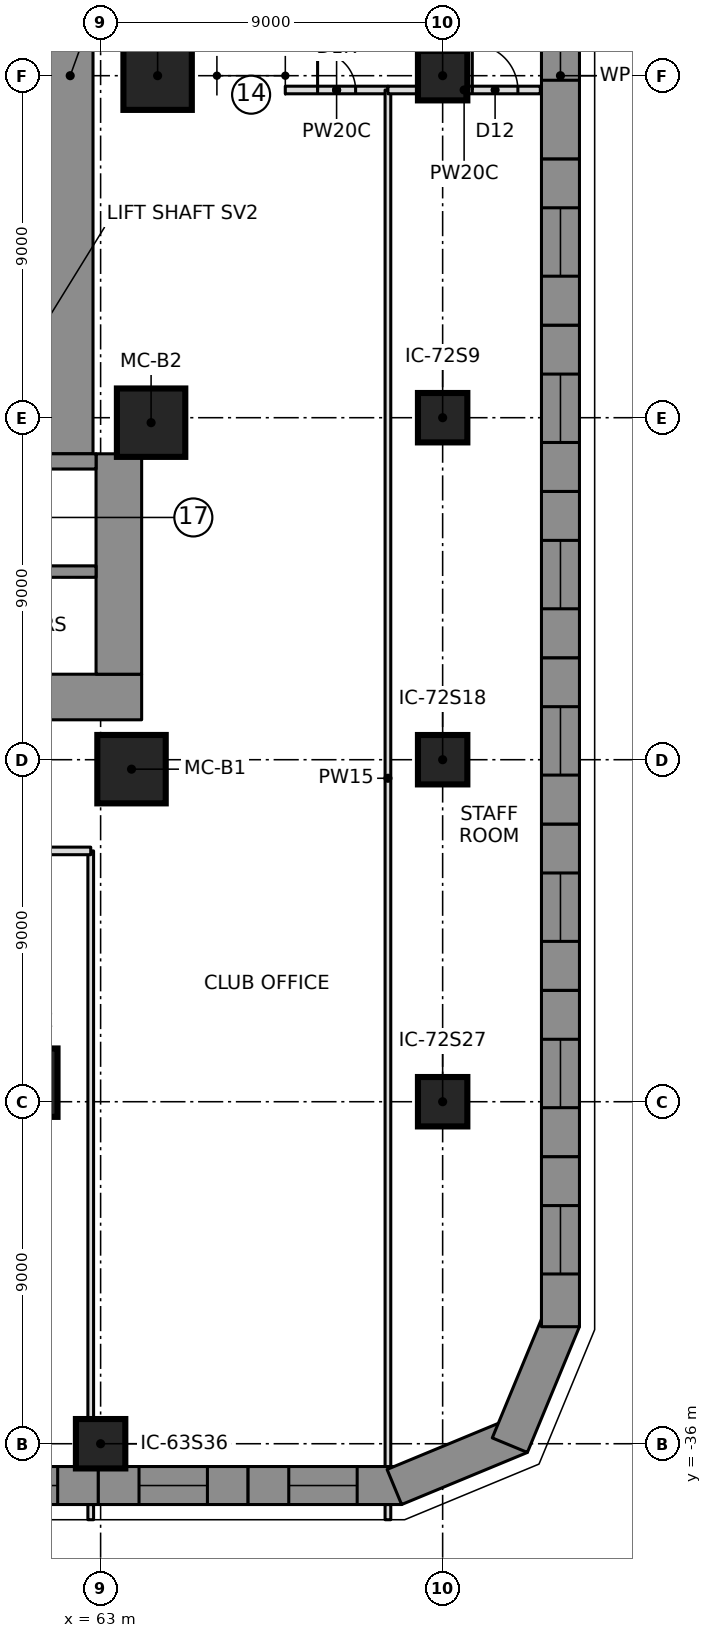
"""IFC4 building model, lengths in metres.
Left out: names, types, materials, properties, quantities, classifications, styles, units other than length and angle.
Written with IfcOpenShell. Run it as: python <this file> out.ifc"""

import sys

from ifc_helpers import new_model, si_unit, direction, frame, frame_2d, origin, origin_2d, place, context, subcontext, project, spatial, polyline, rectangle, outline, extrude, element, fill, save


model = new_model("IFC4")
c1 = context("Model", 3, precision=1e-05, world=origin(), true_north=direction((0.0, 1.0)))
c2 = subcontext(c1, "Body", "Model", "MODEL_VIEW")
j1 = project(units=[si_unit("LENGTHUNIT", "METRE"), si_unit("PLANEANGLEUNIT", "RADIAN")], contexts=[c1])
p1 = place(None, origin())
s1 = spatial("IfcSite", under=j1, at=p1, CompositionType="ELEMENT")
p2 = place(p1, origin())
s2 = spatial("IfcBuilding", under=s1, at=p2, CompositionType="ELEMENT")
p3 = place(p2, frame((0.0, 0.0, 24.0)))
s3 = spatial("IfcBuildingStorey", under=s2, at=p3, CompositionType="ELEMENT", Elevation=24.0)
p4 = place(p3, frame((50.7, -16.35, 0.0), z_axis=(0.0, 0.0, 1.0), x_axis=(1.0, 0.0, 0.0)))
e1 = element("IfcWall", 1, at=p4, inside=s3, PredefinedType="SHEAR", context=c2, shape_type="SweptSolid", body=[
    extrude(rectangle(XDim=13.38, YDim=1.2, at=frame_2d((6.69, 0.0))), origin(), (0.0, 0.0, 1.0), 5.0),
])
p5 = place(p3, frame((63.48, -15.75, 0.0), z_axis=(0.0, 0.0, 1.0), x_axis=(0.0, 1.0, 0.0)))
e2 = element("IfcWall", 2, at=p5, inside=s3, PredefinedType="SHEAR", context=c2, shape_type="SweptSolid", body=[
    extrude(rectangle(XDim=5.8, YDim=1.2, at=frame_2d((2.9, 0.0))), origin(), (0.0, 0.0, 1.0), 5.0),
])
p6 = place(p3, frame((62.2, -9.95, 0.0), z_axis=(0.0, 0.0, 1.0), x_axis=(0.0, 1.0, 0.0)))
e3 = element("IfcWall", 3, at=p6, inside=s3, PredefinedType="SHEAR", context=c2, shape_type="SweptSolid", body=[
    extrude(rectangle(XDim=19.9, YDim=1.2, at=frame_2d((9.95, 0.0))), origin(), (0.0, 0.0, 1.0), 5.0),
])
p7 = place(p3, frame((50.7, -10.15, 0.0), z_axis=(0.0, 0.0, 1.0), x_axis=(1.0, 0.0, 0.0)))
e4 = element("IfcWall", 4, at=p7, inside=s3, PredefinedType="SHEAR", context=c2, shape_type="SweptSolid", body=[
    extrude(rectangle(XDim=12.18, YDim=0.4, at=frame_2d((6.09, 0.0))), origin(), (0.0, 0.0, 1.0), 5.0),
])
p8 = place(p3, frame((56.0, -13.05, 0.0), z_axis=(0.0, 0.0, 1.0), x_axis=(1.0, 0.0, 0.0)))
e5 = element("IfcWall", 5, at=p8, inside=s3, PredefinedType="SHEAR", context=c2, shape_type="SweptSolid", body=[
    extrude(rectangle(XDim=6.88, YDim=0.3, at=frame_2d((3.44, 0.0))), origin(), (0.0, 0.0, 1.0), 5.0),
])
for number, where, z_axis, x_axis in (
    (6, (60.966, -26.499, 0.0), (0.0, 0.0, 1.0), (1.0, 0.0, 0.0)),
    (7, (63.813, -18.249, 0.0), (0.0, 0.0, 1.0), (1.0, 0.0, 0.0)),
    (8, (64.328, -9.131, 0.0), (0.0, 0.0, 1.0), (1.0, 0.0, 0.0)),
    (9, (64.5, 0.0, 0.0), (0.0, 0.0, 1.0), (1.0, 0.0, 0.0)),
):
    element("IfcColumn", number, at=place(p3, frame(where, z_axis=z_axis, x_axis=x_axis)), inside=s3, PredefinedType="COLUMN", context=c2, shape_type="SweptSolid", body=[
        extrude(rectangle(XDim=1.8, YDim=1.8, at=origin_2d()), origin(), (0.0, 0.0, 1.0), 5.0),
    ])
for number, where, z_axis, x_axis in (
    (10, (63.0, -36.0, 0.0), (0.0, 0.0, 1.0), (1.0, 0.0, 0.0)),
    (11, (72.0, -27.0, 0.0), (0.0, 0.0, 1.0), (1.0, 0.0, 0.0)),
    (12, (72.0, -18.0, 0.0), (0.0, 0.0, 1.0), (1.0, 0.0, 0.0)),
    (13, (72.0, -9.0, 0.0), (0.0, 0.0, 1.0), (1.0, 0.0, 0.0)),
    (14, (72.0, 0.0, 0.0), (0.0, 0.0, 1.0), (1.0, 0.0, 0.0)),
):
    element("IfcColumn", number, at=place(p3, frame(where, z_axis=z_axis, x_axis=x_axis)), inside=s3, PredefinedType="COLUMN", context=c2, shape_type="SweptSolid", body=[
        extrude(rectangle(XDim=1.3, YDim=1.3, at=origin_2d()), origin(), (0.0, 0.0, 1.0), 4.65),
    ])
p9 = place(p3, frame((59.0, -37.1, 0.0), z_axis=(0.0, 0.0, 1.0), x_axis=(1.0, 0.0, 0.0)))
e15 = element("IfcWall", 15, at=p9, inside=s3, PredefinedType="NOTDEFINED", context=c2, shape_type="SweptSolid", body=[
    extrude(outline(polyline([(0.0, -0.5), (3.94, -0.5), (3.94, 0.5), (0.0, 0.5), (0.0, -0.5)])), origin(), (0.0, 0.0, 1.0), 4.7),
])
p10 = place(p9, frame((1.07, 0.0, 0.9)))
e16 = element("IfcOpeningElement", 16, at=p10, cuts=e15, PredefinedType="OPENING", context=c2, shape_type="SweptSolid", body=[
    extrude(rectangle(XDim=1.8, YDim=2.4, at=frame_2d((0.9, 1.2))), frame((0.0, 0.51, 0.0), z_axis=(0.0, -1.0, 0.0), x_axis=(1.0, 0.0, 0.0)), (0.0, 0.0, 1.0), 1.02),
])
p11 = place(p3, frame((62.94, -37.1, 0.0), z_axis=(0.0, 0.0, 1.0), x_axis=(1.0, 0.0, 0.0)))
e17 = element("IfcWall", 17, at=p11, inside=s3, PredefinedType="NOTDEFINED", context=c2, shape_type="SweptSolid", body=[
    extrude(outline(polyline([(0.0, -0.5), (3.94, -0.5), (3.94, 0.5), (0.0, 0.5), (0.0, -0.5)])), origin(), (0.0, 0.0, 1.0), 4.7),
])
p12 = place(p11, frame((1.07, 0.0, 0.9)))
e18 = element("IfcOpeningElement", 18, at=p12, cuts=e17, PredefinedType="OPENING", context=c2, shape_type="SweptSolid", body=[
    extrude(rectangle(XDim=1.8, YDim=2.4, at=frame_2d((0.9, 1.2))), frame((0.0, 0.51, 0.0), z_axis=(0.0, -1.0, 0.0), x_axis=(1.0, 0.0, 0.0)), (0.0, 0.0, 1.0), 1.02),
])
p13 = place(p3, frame((66.881, -37.1, 0.0), z_axis=(0.0, 0.0, 1.0), x_axis=(1.0, 0.0, 0.0)))
e19 = element("IfcWall", 19, at=p13, inside=s3, PredefinedType="NOTDEFINED", context=c2, shape_type="SweptSolid", body=[
    extrude(outline(polyline([(0.0, -0.5), (4.04, -0.5), (3.841, 0.5), (0.0, 0.5), (0.0, -0.5)])), origin(), (0.0, 0.0, 1.0), 4.7),
])
p14 = place(p13, frame((1.07, 0.0, 0.9)))
e20 = element("IfcOpeningElement", 20, at=p14, cuts=e19, PredefinedType="OPENING", context=c2, shape_type="SweptSolid", body=[
    extrude(rectangle(XDim=1.8, YDim=2.4, at=frame_2d((0.9, 1.2))), frame((0.0, 0.51, 0.0), z_axis=(0.0, -1.0, 0.0), x_axis=(1.0, 0.0, 0.0)), (0.0, 0.0, 1.0), 1.02),
])
p15 = place(p3, frame((70.821, -37.1, 0.0), z_axis=(0.0, 0.0, 1.0), x_axis=(0.923862365102, 0.382724875529, 0.0)))
e21 = element("IfcWall", 21, at=p15, inside=s3, PredefinedType="NOTDEFINED", context=c2, shape_type="SweptSolid", body=[
    extrude(outline(polyline([(-0.1, -0.5), (3.482, -0.5), (3.068, 0.5), (0.1, 0.5), (-0.1, -0.5)])), origin(), (0.0, 0.0, 1.0), 4.7),
])
p16 = place(p3, frame((73.847, -35.847, 0.0), z_axis=(0.0, 0.0, 1.0), x_axis=(0.382724875529, 0.923862365102, 0.0)))
e22 = element("IfcWall", 22, at=p16, inside=s3, PredefinedType="NOTDEFINED", context=c2, shape_type="SweptSolid", body=[
    extrude(outline(polyline([(-0.207, -0.5), (3.375, -0.5), (3.175, 0.5), (0.207, 0.5), (-0.207, -0.5)])), origin(), (0.0, 0.0, 1.0), 4.7),
])
p17 = place(p3, frame((75.1, -32.821, 0.0), z_axis=(0.0, 0.0, 1.0), x_axis=(0.0, 1.0, 0.0)))
e23 = element("IfcWall", 23, at=p17, inside=s3, PredefinedType="NOTDEFINED", context=c2, shape_type="SweptSolid", body=[
    extrude(outline(polyline([(-0.1, -0.5), (4.376, -0.5), (4.376, 0.5), (0.1, 0.5), (-0.1, -0.5)])), origin(), (0.0, 0.0, 1.0), 4.7),
])
p18 = place(p17, frame((1.288, 0.0, 0.9)))
e24 = element("IfcOpeningElement", 24, at=p18, cuts=e23, PredefinedType="OPENING", context=c2, shape_type="SweptSolid", body=[
    extrude(rectangle(XDim=1.8, YDim=2.4, at=frame_2d((0.9, 1.2))), frame((0.0, 0.51, 0.0), z_axis=(0.0, -1.0, 0.0), x_axis=(1.0, 0.0, 0.0)), (0.0, 0.0, 1.0), 1.02),
])
p19 = place(p3, frame((75.1, -28.445, 0.0), z_axis=(0.0, 0.0, 1.0), x_axis=(0.0, 1.0, 0.0)))
e25 = element("IfcWall", 25, at=p19, inside=s3, PredefinedType="NOTDEFINED", context=c2, shape_type="SweptSolid", body=[
    extrude(outline(polyline([(0.0, -0.5), (4.376, -0.5), (4.376, 0.5), (0.0, 0.5), (0.0, -0.5)])), origin(), (0.0, 0.0, 1.0), 4.7),
])
p20 = place(p19, frame((1.288, 0.0, 0.9)))
e26 = element("IfcOpeningElement", 26, at=p20, cuts=e25, PredefinedType="OPENING", context=c2, shape_type="SweptSolid", body=[
    extrude(rectangle(XDim=1.8, YDim=2.4, at=frame_2d((0.9, 1.2))), frame((0.0, 0.51, 0.0), z_axis=(0.0, -1.0, 0.0), x_axis=(1.0, 0.0, 0.0)), (0.0, 0.0, 1.0), 1.02),
])
p21 = place(p3, frame((75.1, -24.069, 0.0), z_axis=(0.0, 0.0, 1.0), x_axis=(0.0, 1.0, 0.0)))
e27 = element("IfcWall", 27, at=p21, inside=s3, PredefinedType="NOTDEFINED", context=c2, shape_type="SweptSolid", body=[
    extrude(outline(polyline([(0.0, -0.5), (4.376, -0.5), (4.376, 0.5), (0.0, 0.5), (0.0, -0.5)])), origin(), (0.0, 0.0, 1.0), 4.7),
])
p22 = place(p21, frame((1.288, 0.0, 0.9)))
e28 = element("IfcOpeningElement", 28, at=p22, cuts=e27, PredefinedType="OPENING", context=c2, shape_type="SweptSolid", body=[
    extrude(rectangle(XDim=1.8, YDim=2.4, at=frame_2d((0.9, 1.2))), frame((0.0, 0.51, 0.0), z_axis=(0.0, -1.0, 0.0), x_axis=(1.0, 0.0, 0.0)), (0.0, 0.0, 1.0), 1.02),
])
p23 = place(p3, frame((75.1, -19.693, 0.0), z_axis=(0.0, 0.0, 1.0), x_axis=(0.0, 1.0, 0.0)))
e29 = element("IfcWall", 29, at=p23, inside=s3, PredefinedType="NOTDEFINED", context=c2, shape_type="SweptSolid", body=[
    extrude(outline(polyline([(0.0, -0.5), (4.376, -0.5), (4.376, 0.5), (0.0, 0.5), (0.0, -0.5)])), origin(), (0.0, 0.0, 1.0), 4.7),
])
p24 = place(p23, frame((1.288, 0.0, 0.9)))
e30 = element("IfcOpeningElement", 30, at=p24, cuts=e29, PredefinedType="OPENING", context=c2, shape_type="SweptSolid", body=[
    extrude(rectangle(XDim=1.8, YDim=2.4, at=frame_2d((0.9, 1.2))), frame((0.0, 0.51, 0.0), z_axis=(0.0, -1.0, 0.0), x_axis=(1.0, 0.0, 0.0)), (0.0, 0.0, 1.0), 1.02),
])
p25 = place(p3, frame((75.1, -15.316, 0.0), z_axis=(0.0, 0.0, 1.0), x_axis=(0.0, 1.0, 0.0)))
e31 = element("IfcWall", 31, at=p25, inside=s3, PredefinedType="NOTDEFINED", context=c2, shape_type="SweptSolid", body=[
    extrude(outline(polyline([(0.0, -0.5), (4.376, -0.5), (4.376, 0.5), (0.0, 0.5), (0.0, -0.5)])), origin(), (0.0, 0.0, 1.0), 4.7),
])
p26 = place(p25, frame((1.288, 0.0, 0.9)))
e32 = element("IfcOpeningElement", 32, at=p26, cuts=e31, PredefinedType="OPENING", context=c2, shape_type="SweptSolid", body=[
    extrude(rectangle(XDim=1.8, YDim=2.4, at=frame_2d((0.9, 1.2))), frame((0.0, 0.51, 0.0), z_axis=(0.0, -1.0, 0.0), x_axis=(1.0, 0.0, 0.0)), (0.0, 0.0, 1.0), 1.02),
])
p27 = place(p3, frame((75.1, -10.94, 0.0), z_axis=(0.0, 0.0, 1.0), x_axis=(0.0, 1.0, 0.0)))
e33 = element("IfcWall", 33, at=p27, inside=s3, PredefinedType="NOTDEFINED", context=c2, shape_type="SweptSolid", body=[
    extrude(outline(polyline([(0.0, -0.5), (4.376, -0.5), (4.376, 0.5), (0.0, 0.5), (0.0, -0.5)])), origin(), (0.0, 0.0, 1.0), 4.7),
])
p28 = place(p27, frame((1.288, 0.0, 0.9)))
e34 = element("IfcOpeningElement", 34, at=p28, cuts=e33, PredefinedType="OPENING", context=c2, shape_type="SweptSolid", body=[
    extrude(rectangle(XDim=1.8, YDim=2.4, at=frame_2d((0.9, 1.2))), frame((0.0, 0.51, 0.0), z_axis=(0.0, -1.0, 0.0), x_axis=(1.0, 0.0, 0.0)), (0.0, 0.0, 1.0), 1.02),
])
p29 = place(p3, frame((75.1, -6.564, 0.0), z_axis=(0.0, 0.0, 1.0), x_axis=(0.0, 1.0, 0.0)))
e35 = element("IfcWall", 35, at=p29, inside=s3, PredefinedType="NOTDEFINED", context=c2, shape_type="SweptSolid", body=[
    extrude(outline(polyline([(0.0, -0.5), (4.376, -0.5), (4.376, 0.5), (0.0, 0.5), (0.0, -0.5)])), origin(), (0.0, 0.0, 1.0), 4.7),
])
p30 = place(p29, frame((1.288, 0.0, 0.9)))
e36 = element("IfcOpeningElement", 36, at=p30, cuts=e35, PredefinedType="OPENING", context=c2, shape_type="SweptSolid", body=[
    extrude(rectangle(XDim=1.8, YDim=2.4, at=frame_2d((0.9, 1.2))), frame((0.0, 0.51, 0.0), z_axis=(0.0, -1.0, 0.0), x_axis=(1.0, 0.0, 0.0)), (0.0, 0.0, 1.0), 1.02),
])
p31 = place(p3, frame((75.1, -2.188, 0.0), z_axis=(0.0, 0.0, 1.0), x_axis=(0.0, 1.0, 0.0)))
e37 = element("IfcWall", 37, at=p31, inside=s3, PredefinedType="NOTDEFINED", context=c2, shape_type="SweptSolid", body=[
    extrude(outline(polyline([(0.0, -0.5), (4.376, -0.5), (4.376, 0.5), (0.0, 0.5), (0.0, -0.5)])), origin(), (0.0, 0.0, 1.0), 4.7),
])
p32 = place(p31, frame((2.068, 0.0, 0.9)))
e38 = element("IfcOpeningElement", 38, at=p32, cuts=e37, PredefinedType="OPENING", context=c2, shape_type="SweptSolid", body=[
    extrude(rectangle(XDim=1.8, YDim=2.4, at=frame_2d((0.9, 1.2))), frame((0.0, 0.51, 0.0), z_axis=(0.0, -1.0, 0.0), x_axis=(1.0, 0.0, 0.0)), (0.0, 0.0, 1.0), 1.02),
])
p33 = place(p3, frame((62.74, -38.0, 0.0), z_axis=(0.0, 0.0, 1.0), x_axis=(0.0, 1.0, 0.0)))
e39 = element("IfcWall", 39, at=p33, inside=s3, PredefinedType="PARTITIONING", context=c2, shape_type="SweptSolid", body=[
    extrude(rectangle(XDim=0.4, YDim=0.15, at=frame_2d((0.2, 0.0))), origin(), (0.0, 0.0, 1.0), 4.55),
])
p34 = place(p3, frame((62.74, -36.6, 0.0), z_axis=(0.0, 0.0, 1.0), x_axis=(0.0, 1.0, 0.0)))
e40 = element("IfcWall", 40, at=p34, inside=s3, PredefinedType="PARTITIONING", context=c2, shape_type="SweptSolid", body=[
    extrude(rectangle(XDim=16.2, YDim=0.15, at=frame_2d((8.1, 0.0))), origin(), (0.0, 0.0, 1.0), 4.55),
])
p35 = place(p3, frame((67.859, -0.376, 0.0), z_axis=(0.0, 0.0, 1.0), x_axis=(1.0, 0.0, 0.0)))
e41 = element("IfcWall", 41, at=p35, inside=s3, PredefinedType="PARTITIONING", context=c2, shape_type="SweptSolid", body=[
    extrude(rectangle(XDim=2.701, YDim=0.2, at=frame_2d((1.351, 0.0))), origin(), (0.0, 0.0, 1.0), 4.55),
])
p36 = place(p35, frame((0.851, 0.0, 0.0)))
e42 = element("IfcOpeningElement", 42, at=p36, cuts=e41, PredefinedType="OPENING", context=c2, shape_type="SweptSolid", body=[
    extrude(rectangle(XDim=1.0, YDim=2.1, at=frame_2d((0.5, 1.05))), frame((0.0, 0.11, 0.0), z_axis=(0.0, -1.0, 0.0), x_axis=(1.0, 0.0, 0.0)), (0.0, 0.0, 1.0), 0.22),
])
p37 = place(p3, frame((70.56, -38.0, 0.0), z_axis=(0.0, 0.0, 1.0), x_axis=(0.0, 1.0, 0.0)))
e43 = element("IfcWall", 43, at=p37, inside=s3, PredefinedType="PARTITIONING", context=c2, shape_type="SweptSolid", body=[
    extrude(rectangle(XDim=0.4, YDim=0.15, at=frame_2d((0.2, 0.0))), origin(), (0.0, 0.0, 1.0), 4.55),
])
p38 = place(p3, frame((70.56, -36.6, 0.0), z_axis=(0.0, 0.0, 1.0), x_axis=(0.0, 1.0, 0.0)))
e44 = element("IfcWall", 44, at=p38, inside=s3, PredefinedType="PARTITIONING", context=c2, shape_type="SweptSolid", body=[
    extrude(rectangle(XDim=36.224, YDim=0.15, at=frame_2d((18.112, 0.0))), origin(), (0.0, 0.0, 1.0), 4.55),
])
p39 = place(p3, frame((70.56, -0.376, 0.0), z_axis=(0.0, 0.0, 1.0), x_axis=(1.0, 0.0, 0.0)))
e45 = element("IfcWall", 45, at=p39, inside=s3, PredefinedType="PARTITIONING", context=c2, shape_type="SweptSolid", body=[
    extrude(rectangle(XDim=4.01, YDim=0.2, at=frame_2d((2.005, 0.0))), origin(), (0.0, 0.0, 1.0), 4.55),
])
p40 = place(p39, frame((2.22, 0.0, 0.0)))
e46 = element("IfcOpeningElement", 46, at=p40, cuts=e45, PredefinedType="OPENING", context=c2, shape_type="SweptSolid", body=[
    extrude(rectangle(XDim=1.2, YDim=2.1, at=frame_2d((0.6, 1.05))), frame((0.0, 0.11, 0.0), z_axis=(0.0, -1.0, 0.0), x_axis=(1.0, 0.0, 0.0)), (0.0, 0.0, 1.0), 0.22),
])
p41 = place(p3, frame((54.58, -20.4, 0.0), z_axis=(0.0, 0.0, 1.0), x_axis=(1.0, 0.0, 0.0)))
e47 = element("IfcWall", 47, at=p41, inside=s3, PredefinedType="PARTITIONING", context=c2, shape_type="SweptSolid", body=[
    extrude(rectangle(XDim=8.16, YDim=0.2, at=frame_2d((4.08, 0.0))), origin(), (0.0, 0.0, 1.0), 4.55),
])
p42 = place(p41, frame((3.58, 0.0, 0.0)))
e48 = element("IfcOpeningElement", 48, at=p42, cuts=e47, PredefinedType="OPENING", context=c2, shape_type="SweptSolid", body=[
    extrude(rectangle(XDim=1.2, YDim=2.1, at=frame_2d((0.6, 1.05))), frame((0.0, 0.11, 0.0), z_axis=(0.0, -1.0, 0.0), x_axis=(1.0, 0.0, 0.0)), (0.0, 0.0, 1.0), 0.22),
])
p43 = place(p10, origin())
e49 = element("IfcWindow", 49, at=p43, inside=s3, PartitioningType="SINGLE_PANEL", PredefinedType="WINDOW", context=c2, shape_type="SweptSolid", body=[
    extrude(rectangle(XDim=1.8, YDim=2.4, at=frame_2d((0.9, 1.2))), frame((0.0, 0.5, 0.0), z_axis=(0.0, -1.0, 0.0), x_axis=(1.0, 0.0, 0.0)), (0.0, 0.0, 1.0), 0.06),
])
fill(e16, e49)
p44 = place(p12, origin())
e50 = element("IfcWindow", 50, at=p44, inside=s3, PartitioningType="SINGLE_PANEL", PredefinedType="WINDOW", context=c2, shape_type="SweptSolid", body=[
    extrude(rectangle(XDim=1.8, YDim=2.4, at=frame_2d((0.9, 1.2))), frame((0.0, 0.5, 0.0), z_axis=(0.0, -1.0, 0.0), x_axis=(1.0, 0.0, 0.0)), (0.0, 0.0, 1.0), 0.06),
])
fill(e18, e50)
p45 = place(p14, origin())
e51 = element("IfcWindow", 51, at=p45, inside=s3, PartitioningType="SINGLE_PANEL", PredefinedType="WINDOW", context=c2, shape_type="SweptSolid", body=[
    extrude(rectangle(XDim=1.8, YDim=2.4, at=frame_2d((0.9, 1.2))), frame((0.0, 0.5, 0.0), z_axis=(0.0, -1.0, 0.0), x_axis=(1.0, 0.0, 0.0)), (0.0, 0.0, 1.0), 0.06),
])
fill(e20, e51)
p46 = place(p18, origin())
e52 = element("IfcWindow", 52, at=p46, inside=s3, PartitioningType="SINGLE_PANEL", PredefinedType="WINDOW", context=c2, shape_type="SweptSolid", body=[
    extrude(rectangle(XDim=1.8, YDim=2.4, at=frame_2d((0.9, 1.2))), frame((0.0, 0.5, 0.0), z_axis=(0.0, -1.0, 0.0), x_axis=(1.0, 0.0, 0.0)), (0.0, 0.0, 1.0), 0.06),
])
fill(e24, e52)
p47 = place(p20, origin())
e53 = element("IfcWindow", 53, at=p47, inside=s3, PartitioningType="SINGLE_PANEL", PredefinedType="WINDOW", context=c2, shape_type="SweptSolid", body=[
    extrude(rectangle(XDim=1.8, YDim=2.4, at=frame_2d((0.9, 1.2))), frame((0.0, 0.5, 0.0), z_axis=(0.0, -1.0, 0.0), x_axis=(1.0, 0.0, 0.0)), (0.0, 0.0, 1.0), 0.06),
])
fill(e26, e53)
p48 = place(p22, origin())
e54 = element("IfcWindow", 54, at=p48, inside=s3, PartitioningType="SINGLE_PANEL", PredefinedType="WINDOW", context=c2, shape_type="SweptSolid", body=[
    extrude(rectangle(XDim=1.8, YDim=2.4, at=frame_2d((0.9, 1.2))), frame((0.0, 0.5, 0.0), z_axis=(0.0, -1.0, 0.0), x_axis=(1.0, 0.0, 0.0)), (0.0, 0.0, 1.0), 0.06),
])
fill(e28, e54)
p49 = place(p24, origin())
e55 = element("IfcWindow", 55, at=p49, inside=s3, PartitioningType="SINGLE_PANEL", PredefinedType="WINDOW", context=c2, shape_type="SweptSolid", body=[
    extrude(rectangle(XDim=1.8, YDim=2.4, at=frame_2d((0.9, 1.2))), frame((0.0, 0.5, 0.0), z_axis=(0.0, -1.0, 0.0), x_axis=(1.0, 0.0, 0.0)), (0.0, 0.0, 1.0), 0.06),
])
fill(e30, e55)
p50 = place(p26, origin())
e56 = element("IfcWindow", 56, at=p50, inside=s3, PartitioningType="SINGLE_PANEL", PredefinedType="WINDOW", context=c2, shape_type="SweptSolid", body=[
    extrude(rectangle(XDim=1.8, YDim=2.4, at=frame_2d((0.9, 1.2))), frame((0.0, 0.5, 0.0), z_axis=(0.0, -1.0, 0.0), x_axis=(1.0, 0.0, 0.0)), (0.0, 0.0, 1.0), 0.06),
])
fill(e32, e56)
p51 = place(p28, origin())
e57 = element("IfcWindow", 57, at=p51, inside=s3, PartitioningType="SINGLE_PANEL", PredefinedType="WINDOW", context=c2, shape_type="SweptSolid", body=[
    extrude(rectangle(XDim=1.8, YDim=2.4, at=frame_2d((0.9, 1.2))), frame((0.0, 0.5, 0.0), z_axis=(0.0, -1.0, 0.0), x_axis=(1.0, 0.0, 0.0)), (0.0, 0.0, 1.0), 0.06),
])
fill(e34, e57)
p52 = place(p30, origin())
e58 = element("IfcWindow", 58, at=p52, inside=s3, PartitioningType="SINGLE_PANEL", PredefinedType="WINDOW", context=c2, shape_type="SweptSolid", body=[
    extrude(rectangle(XDim=1.8, YDim=2.4, at=frame_2d((0.9, 1.2))), frame((0.0, 0.5, 0.0), z_axis=(0.0, -1.0, 0.0), x_axis=(1.0, 0.0, 0.0)), (0.0, 0.0, 1.0), 0.06),
])
fill(e36, e58)
p53 = place(p32, origin())
e59 = element("IfcWindow", 59, at=p53, inside=s3, PartitioningType="SINGLE_PANEL", PredefinedType="WINDOW", context=c2, shape_type="SweptSolid", body=[
    extrude(rectangle(XDim=1.8, YDim=2.4, at=frame_2d((0.9, 1.2))), frame((0.0, 0.5, 0.0), z_axis=(0.0, -1.0, 0.0), x_axis=(1.0, 0.0, 0.0)), (0.0, 0.0, 1.0), 0.06),
])
fill(e38, e59)
p54 = place(p36, origin())
e60 = element("IfcDoor", 60, at=p54, inside=s3, OperationType="SINGLE_SWING_RIGHT", PredefinedType="DOOR", context=c2, shape_type="SweptSolid", body=[
    extrude(rectangle(XDim=1.0, YDim=2.1, at=frame_2d((0.5, 1.05))), frame((0.0, 0.025, 0.0), z_axis=(0.0, -1.0, 0.0), x_axis=(1.0, 0.0, 0.0)), (0.0, 0.0, 1.0), 0.05),
])
fill(e42, e60)
p55 = place(p40, origin())
e61 = element("IfcDoor", 61, at=p55, inside=s3, OperationType="SINGLE_SWING_RIGHT", PredefinedType="DOOR", context=c2, shape_type="SweptSolid", body=[
    extrude(rectangle(XDim=1.2, YDim=2.1, at=frame_2d((0.6, 1.05))), frame((0.0, 0.025, 0.0), z_axis=(0.0, -1.0, 0.0), x_axis=(1.0, 0.0, 0.0)), (0.0, 0.0, 1.0), 0.05),
])
fill(e46, e61)
save(model, sys.argv[1])
